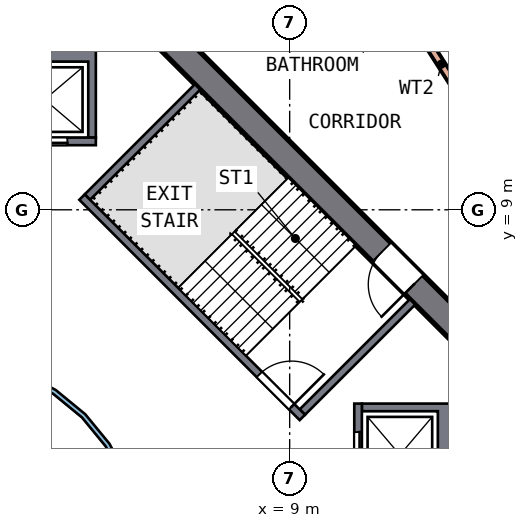
"""IFC4 building model, lengths in metres.
Left out: names, types, materials, properties, quantities, classifications, styles, units other than length and angle.
Written with IfcOpenShell. Run it as: python <this file> out.ifc"""

import sys

from ifc_helpers import new_model, si_unit, direction, frame, frame_2d, origin, place, context, subcontext, project, spatial, polyline, rectangle, outline, extrude, element, fill, save


model = new_model("IFC4")
c1 = context("Model", 3, precision=1e-05, world=origin(), true_north=direction((0.0, 1.0)))
c2 = subcontext(c1, "Body", "Model", "MODEL_VIEW")
j1 = project(units=[si_unit("LENGTHUNIT", "METRE"), si_unit("PLANEANGLEUNIT", "RADIAN")], contexts=[c1])
p1 = place(None, origin())
s1 = spatial("IfcSite", under=j1, at=p1, CompositionType="ELEMENT")
p2 = place(p1, origin())
s2 = spatial("IfcBuilding", under=s1, at=p2, CompositionType="ELEMENT")
p3 = place(p2, frame((0.0, 0.0, 165.5)))
s3 = spatial("IfcBuildingStorey", under=s2, at=p3, CompositionType="ELEMENT", Elevation=165.5)
p4 = place(p3, frame((13.752, 5.552, 0.0), z_axis=(0.0, 0.0, 1.0), x_axis=(-0.707106781, 0.707106781, 0.0)))
e1 = element("IfcWall", 1, at=p4, inside=s3, PredefinedType="SHEAR", context=c2, shape_type="SweptSolid", body=[
    extrude(rectangle(XDim=11.598, YDim=0.7, at=frame_2d((5.799, 0.0))), origin(), (0.0, 0.0, 1.0), 3.5),
])
p5 = place(p4, frame((2.099, 0.0, 0.0)))
e2 = element("IfcOpeningElement", 2, at=p5, cuts=e1, PredefinedType="OPENING", context=c2, shape_type="SweptSolid", body=[
    extrude(rectangle(XDim=1.2, YDim=2.1, at=frame_2d((0.6, 1.05))), frame((0.0, 0.36, 0.0), z_axis=(0.0, -1.0, 0.0), x_axis=(1.0, 0.0, 0.0)), (0.0, 0.0, 1.0), 0.72),
])
p6 = place(p3, frame((11.532, 15.105, 0.0), z_axis=(0.0, 0.0, 1.0), x_axis=(0.53936062, -0.842074891, 0.0)))
e3 = element("IfcWall", 3, at=p6, inside=s3, PredefinedType="SOLIDWALL", context=c2, shape_type="SweptSolid", body=[
    extrude(rectangle(XDim=13.0, YDim=0.2, at=frame_2d((6.5, 0.0))), origin(), (0.0, 0.0, 1.0), 3.0),
])
p7 = place(p6, frame((5.6, 0.0, 0.0)))
e4 = element("IfcOpeningElement", 4, at=p7, cuts=e3, PredefinedType="OPENING", context=c2, shape_type="SweptSolid", body=[
    extrude(rectangle(XDim=1.8, YDim=2.4, at=frame_2d((0.9, 1.2))), frame((0.0, 0.11, 0.0), z_axis=(0.0, -1.0, 0.0), x_axis=(1.0, 0.0, 0.0)), (0.0, 0.0, 1.0), 0.22),
])
p8 = place(p3, origin())
e5 = element("IfcWall", 5, at=p8, inside=s3, PredefinedType="SOLIDWALL", context=c2, shape_type="SweptSolid", body=[
    extrude(outline(polyline([(13.3, 3.9), (13.3, 1.2), (10.9, 1.2), (10.9, 1.4), (12.9, 1.4), (12.9, 3.7), (10.9, 3.7), (10.9, 3.9), (13.3, 3.9)])), origin(), (0.0, 0.0, 1.0), 3.0),
])
p9 = place(p3, frame((10.8, 1.2, 0.0), z_axis=(0.0, 0.0, 1.0), x_axis=(0.0, 1.0, 0.0)))
e6 = element("IfcWall", 6, at=p9, inside=s3, PredefinedType="SOLIDWALL", context=c2, shape_type="SweptSolid", body=[
    extrude(rectangle(XDim=2.7, YDim=0.2, at=frame_2d((1.35, 0.0))), origin(), (0.0, 0.0, 1.0), 3.0),
])
p10 = place(p9, frame((0.75, 0.0, 0.0)))
e7 = element("IfcOpeningElement", 7, at=p10, cuts=e6, PredefinedType="OPENING", context=c2, shape_type="SweptSolid", body=[
    extrude(rectangle(XDim=1.2, YDim=2.1, at=frame_2d((0.6, 1.05))), frame((0.0, 0.11, 0.0), z_axis=(0.0, -1.0, 0.0), x_axis=(1.0, 0.0, 0.0)), (0.0, 0.0, 1.0), 0.22),
])
p11 = place(p3, origin())
e8 = element("IfcWall", 8, at=p11, inside=s3, PredefinedType="SOLIDWALL", context=c2, shape_type="SweptSolid", body=[
    extrude(outline(polyline([(3.9, 13.3), (3.9, 10.9), (3.7, 10.9), (3.7, 12.9), (1.4, 12.9), (1.4, 10.9), (1.2, 10.9), (1.2, 13.3), (3.9, 13.3)])), origin(), (0.0, 0.0, 1.0), 3.0),
])
p12 = place(p3, frame((1.2, 10.8, 0.0), z_axis=(0.0, 0.0, 1.0), x_axis=(1.0, 0.0, 0.0)))
e9 = element("IfcWall", 9, at=p12, inside=s3, PredefinedType="SOLIDWALL", context=c2, shape_type="SweptSolid", body=[
    extrude(rectangle(XDim=2.7, YDim=0.2, at=frame_2d((1.35, 0.0))), origin(), (0.0, 0.0, 1.0), 3.0),
])
p13 = place(p12, frame((0.75, 0.0, 0.0)))
e10 = element("IfcOpeningElement", 10, at=p13, cuts=e9, PredefinedType="OPENING", context=c2, shape_type="SweptSolid", body=[
    extrude(rectangle(XDim=1.2, YDim=2.1, at=frame_2d((0.6, 1.05))), frame((0.0, 0.11, 0.0), z_axis=(0.0, -1.0, 0.0), x_axis=(1.0, 0.0, 0.0)), (0.0, 0.0, 1.0), 0.22),
])
p14 = place(p3, frame((3.535, 9.334, 0.0), z_axis=(0.0, 0.0, 1.0), x_axis=(0.707106781, -0.707106781, 0.0)))
e11 = element("IfcWall", 11, at=p14, inside=s3, PredefinedType="SOLIDWALL", context=c2, shape_type="SweptSolid", body=[
    extrude(rectangle(XDim=8.2, YDim=0.2, at=frame_2d((4.1, 0.0))), origin(), (0.0, 0.0, 1.0), 3.0),
])
p15 = place(p14, frame((6.6, 0.0, 0.0)))
e12 = element("IfcOpeningElement", 12, at=p15, cuts=e11, PredefinedType="OPENING", context=c2, shape_type="SweptSolid", body=[
    extrude(rectangle(XDim=1.2, YDim=2.1, at=frame_2d((0.6, 1.05))), frame((0.0, 0.11, 0.0), z_axis=(0.0, -1.0, 0.0), x_axis=(1.0, 0.0, 0.0)), (0.0, 0.0, 1.0), 0.22),
])
for number, where, z_axis, x_axis in (
    (13, (9.334, 3.677, 0.0), (0.0, 0.0, 1.0), (0.707, 0.707, 0.0)),
    (14, (3.677, 9.334, 0.0), (0.0, 0.0, 1.0), (0.707, 0.707, 0.0)),
):
    element("IfcWall", number, at=place(p3, frame(where, z_axis=z_axis, x_axis=x_axis)), inside=s3, PredefinedType="SOLIDWALL", context=c2, shape_type="SweptSolid", body=[
        extrude(rectangle(XDim=4.1, YDim=0.2, at=frame_2d((2.05, 0.0))), origin(), (0.0, 0.0, 1.0), 3.0),
    ])
p16 = place(p3, origin())
e15 = element("IfcWall", 15, at=p16, inside=s3, PredefinedType="SOLIDWALL", context=c2, shape_type="SweptSolid", body=[
    extrude(outline(polyline([(5.021, -0.999), (4.73, -1.959), (4.257, -2.844), (3.62, -3.62), (2.844, -4.257), (1.959, -4.73), (0.999, -5.021), (0.0, -5.12), (-0.999, -5.021), (-1.959, -4.73), (-2.844, -4.257), (-3.62, -3.62), (-4.257, -2.844), (-4.73, -1.959), (-5.021, -0.999), (-5.12, 0.0), (-5.021, 0.999), (-4.73, 1.959), (-4.257, 2.844), (-3.62, 3.62), (-2.844, 4.257), (-1.959, 4.73), (-0.999, 5.021), (0.0, 5.12), (0.999, 5.021), (1.959, 4.73), (2.844, 4.257), (3.62, 3.62), (4.257, 2.844), (4.73, 1.959), (5.021, 0.999), (5.12, 0.0), (5.021, -0.999)]), holes=[polyline([(4.904, 0.976), (4.619, 1.913), (4.157, 2.778), (3.535, 3.535), (2.778, 4.157), (1.913, 4.619), (0.976, 4.904), (0.0, 5.0), (-0.976, 4.904), (-1.913, 4.619), (-2.778, 4.157), (-3.535, 3.535), (-4.157, 2.778), (-4.619, 1.913), (-4.904, 0.976), (-5.0, 0.0), (-4.904, -0.976), (-4.619, -1.913), (-4.157, -2.778), (-3.535, -3.535), (-2.778, -4.157), (-1.913, -4.619), (-0.976, -4.904), (0.0, -5.0), (0.976, -4.904), (1.913, -4.619), (2.778, -4.157), (3.535, -3.535), (4.157, -2.778), (4.619, -1.913), (4.904, -0.976), (5.0, 0.0), (4.904, 0.976)])]), origin(), (0.0, 0.0, 1.0), 3.0),
])
p17 = place(p10, origin())
e16 = element("IfcDoor", 16, at=p17, inside=s3, OperationType="DOUBLE_DOOR_SLIDING", PredefinedType="DOOR", context=c2, shape_type="SweptSolid", body=[
    extrude(rectangle(XDim=1.2, YDim=2.1, at=frame_2d((0.6, 1.05))), frame((0.0, 0.025, 0.0), z_axis=(0.0, -1.0, 0.0), x_axis=(1.0, 0.0, 0.0)), (0.0, 0.0, 1.0), 0.05),
])
fill(e7, e16)
p18 = place(p13, origin())
e17 = element("IfcDoor", 17, at=p18, inside=s3, OperationType="DOUBLE_DOOR_SLIDING", PredefinedType="DOOR", context=c2, shape_type="SweptSolid", body=[
    extrude(rectangle(XDim=1.2, YDim=2.1, at=frame_2d((0.6, 1.05))), frame((0.0, 0.025, 0.0), z_axis=(0.0, -1.0, 0.0), x_axis=(1.0, 0.0, 0.0)), (0.0, 0.0, 1.0), 0.05),
])
fill(e10, e17)
p19 = place(p15, origin())
e18 = element("IfcDoor", 18, at=p19, inside=s3, OperationType="SINGLE_SWING_RIGHT", PredefinedType="DOOR", context=c2, shape_type="SweptSolid", body=[
    extrude(rectangle(XDim=1.2, YDim=2.1, at=frame_2d((0.6, 1.05))), frame((0.0, 0.025, 0.0), z_axis=(0.0, -1.0, 0.0), x_axis=(1.0, 0.0, 0.0)), (0.0, 0.0, 1.0), 0.05),
])
fill(e12, e18)
p20 = place(p5, origin())
e19 = element("IfcDoor", 19, at=p20, inside=s3, OperationType="SINGLE_SWING_LEFT", PredefinedType="DOOR", context=c2, shape_type="SweptSolid", body=[
    extrude(rectangle(XDim=1.2, YDim=2.1, at=frame_2d((0.6, 1.05))), frame((0.0, 0.025, 0.0), z_axis=(0.0, -1.0, 0.0), x_axis=(1.0, 0.0, 0.0)), (0.0, 0.0, 1.0), 0.05),
])
fill(e2, e19)
save(model, sys.argv[1])
